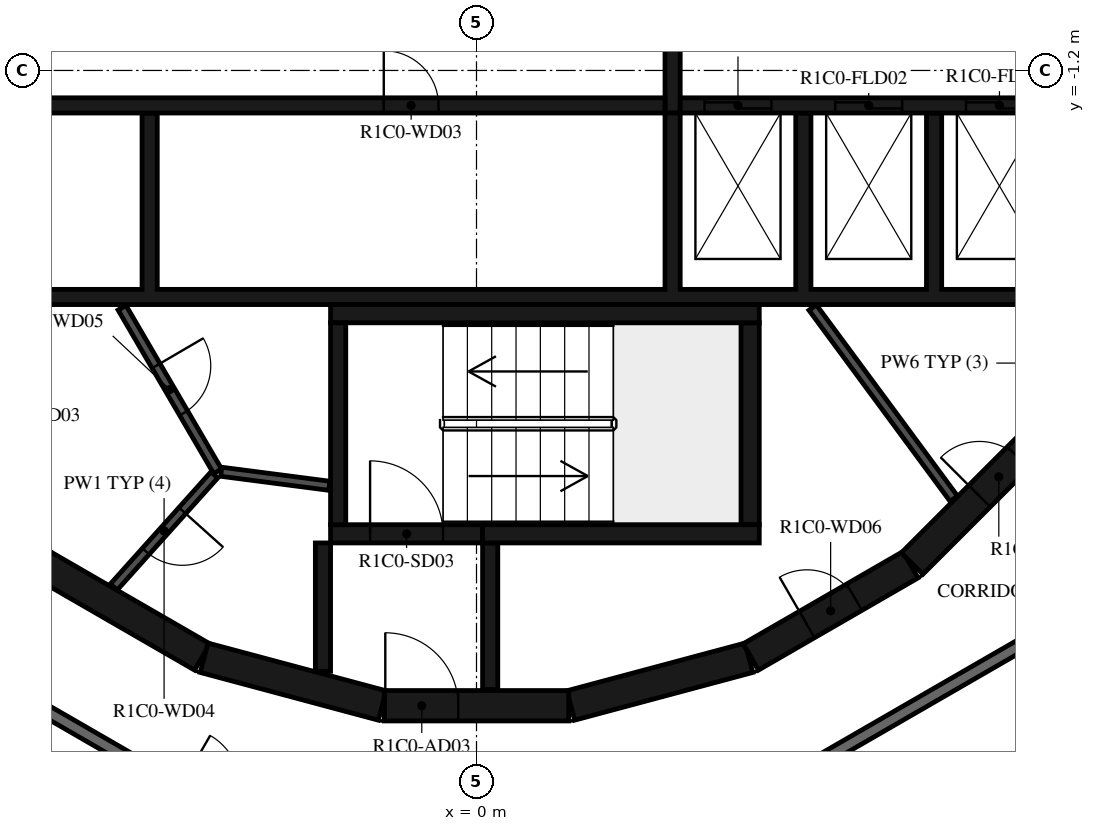
"""IFC4 building model, lengths in metres.
Left out: names, types, materials, properties, quantities, classifications, styles, units other than length and angle.
Written with IfcOpenShell. Run it as: python <this file> out.ifc"""

import sys

from ifc_helpers import new_model, si_unit, direction, frame, frame_2d, origin, place, context, subcontext, project, spatial, polyline, rectangle, outline, extrude, element, fill, save


model = new_model("IFC4")
c1 = context("Model", 3, precision=1e-05, world=origin(), true_north=direction((0.0, 1.0)))
c2 = subcontext(c1, "Body", "Model", "MODEL_VIEW")
j1 = project(units=[si_unit("LENGTHUNIT", "METRE"), si_unit("PLANEANGLEUNIT", "RADIAN")], contexts=[c1])
p1 = place(None, origin())
s1 = spatial("IfcSite", under=j1, at=p1, CompositionType="ELEMENT")
p2 = place(p1, origin())
s2 = spatial("IfcBuilding", under=s1, at=p2, CompositionType="ELEMENT")
p3 = place(p2, frame((0.0, 0.0, 59.4)))
s3 = spatial("IfcBuildingStorey", under=s2, at=p3, CompositionType="ELEMENT", Elevation=59.4)
p4 = place(p3, frame((1.55, -11.643, 0.0), z_axis=(0.0, 0.0, 1.0), x_axis=(0.965948410781, 0.258734743916, 0.0)))
e1 = element("IfcWall", 1, at=p4, inside=s3, PredefinedType="SHEAR", context=c2, shape_type="SweptSolid", body=[
    extrude(rectangle(XDim=3.033, YDim=0.5, at=frame_2d((1.516, 0.0))), origin(), (0.0, 0.0, 1.0), 3.12),
])
p5 = place(p3, frame((4.51, -10.845, 0.0), z_axis=(0.0, 0.0, 1.0), x_axis=(0.865975092491, 0.500087131594, 0.0)))
e2 = element("IfcWall", 2, at=p5, inside=s3, PredefinedType="SHEAR", context=c2, shape_type="SweptSolid", body=[
    extrude(rectangle(XDim=3.033, YDim=0.5, at=frame_2d((1.516, 0.0))), origin(), (0.0, 0.0, 1.0), 3.12),
])
p6 = place(p5, frame((1.066, 0.0, 0.0)))
e3 = element("IfcOpeningElement", 3, at=p6, cuts=e2, PredefinedType="OPENING", context=c2, shape_type="SweptSolid", body=[
    extrude(rectangle(XDim=0.9, YDim=2.1, at=frame_2d((0.45, 1.05))), frame((0.0, 0.26, 0.0), z_axis=(0.0, -1.0, 0.0), x_axis=(1.0, 0.0, 0.0)), (0.0, 0.0, 1.0), 0.52),
])
p7 = place(p3, frame((7.164, -9.308, 0.0), z_axis=(0.0, 0.0, 1.0), x_axis=(0.707106781187, 0.707106781187, 0.0)))
e4 = element("IfcWall", 4, at=p7, inside=s3, PredefinedType="SHEAR", context=c2, shape_type="SweptSolid", body=[
    extrude(rectangle(XDim=3.032, YDim=0.5, at=frame_2d((1.516, 0.0))), origin(), (0.0, 0.0, 1.0), 3.12),
])
p8 = place(p7, frame((1.566, 0.0, 0.0)))
e5 = element("IfcOpeningElement", 5, at=p8, cuts=e4, PredefinedType="OPENING", context=c2, shape_type="SweptSolid", body=[
    extrude(rectangle(XDim=0.9, YDim=2.1, at=frame_2d((0.45, 1.05))), frame((0.0, 0.26, 0.0), z_axis=(0.0, -1.0, 0.0), x_axis=(1.0, 0.0, 0.0)), (0.0, 0.0, 1.0), 0.52),
])
for number, where, z_axis, x_axis in (
    (6, (-7.137, -9.329, 0.0), (0.0, 0.0, 1.0), (0.866, -0.5, 0.0)),
    (7, (-4.479, -10.858, 0.0), (0.0, 0.0, 1.0), (0.966, -0.259, 0.0)),
):
    element("IfcWall", number, at=place(p3, frame(where, z_axis=z_axis, x_axis=x_axis)), inside=s3, PredefinedType="SHEAR", context=c2, shape_type="SweptSolid", body=[
        extrude(rectangle(XDim=3.033, YDim=0.5, at=frame_2d((1.516, 0.0))), origin(), (0.0, 0.0, 1.0), 3.12),
    ])
p9 = place(p3, frame((-1.516, -11.647, 0.0), z_axis=(0.0, 0.0, 1.0), x_axis=(1.0, 0.0, 0.0)))
e8 = element("IfcWall", 8, at=p9, inside=s3, PredefinedType="SHEAR", context=c2, shape_type="SweptSolid", body=[
    extrude(rectangle(XDim=3.033, YDim=0.5, at=frame_2d((1.516, 0.0))), origin(), (0.0, 0.0, 1.0), 3.12),
])
p10 = place(p9, frame((0.016, 0.0, 0.0)))
e9 = element("IfcOpeningElement", 9, at=p10, cuts=e8, PredefinedType="OPENING", context=c2, shape_type="SweptSolid", body=[
    extrude(rectangle(XDim=1.2, YDim=2.1, at=frame_2d((0.6, 1.05))), frame((0.0, 0.26, 0.0), z_axis=(0.0, -1.0, 0.0), x_axis=(1.0, 0.0, 0.0)), (0.0, 0.0, 1.0), 0.52),
])
p11 = place(p3, frame((-2.275, -8.67, 0.0), z_axis=(0.0, 0.0, 1.0), x_axis=(0.0, 1.0, 0.0)))
e10 = element("IfcWall", 10, at=p11, inside=s3, PredefinedType="SHEAR", context=c2, shape_type="SweptSolid", body=[
    extrude(rectangle(XDim=3.32, YDim=0.25, at=frame_2d((1.66, 0.0))), origin(), (0.0, 0.0, 1.0), 3.12),
])
p12 = place(p3, frame((-2.4, -5.2, 0.0), z_axis=(0.0, 0.0, 1.0), x_axis=(1.0, 0.0, 0.0)))
e11 = element("IfcWall", 11, at=p12, inside=s3, PredefinedType="SHEAR", context=c2, shape_type="SweptSolid", body=[
    extrude(rectangle(XDim=7.05, YDim=0.3, at=frame_2d((3.525, 0.0))), origin(), (0.0, 0.0, 1.0), 3.12),
])
p13 = place(p3, frame((4.5, -8.67, 0.0), z_axis=(0.0, 0.0, 1.0), x_axis=(0.0, 1.0, 0.0)))
e12 = element("IfcWall", 12, at=p13, inside=s3, PredefinedType="SHEAR", context=c2, shape_type="SweptSolid", body=[
    extrude(rectangle(XDim=3.32, YDim=0.3, at=frame_2d((1.66, 0.0))), origin(), (0.0, 0.0, 1.0), 3.12),
])
p14 = place(p3, frame((0.1, -8.82, 0.0), z_axis=(0.0, 0.0, 1.0), x_axis=(1.0, 0.0, 0.0)))
e13 = element("IfcWall", 13, at=p14, inside=s3, PredefinedType="SHEAR", context=c2, shape_type="SweptSolid", body=[
    extrude(rectangle(XDim=4.55, YDim=0.3, at=frame_2d((2.275, 0.0))), origin(), (0.0, 0.0, 1.0), 3.12),
])
p15 = place(p3, frame((-2.4, -8.82, 0.0), z_axis=(0.0, 0.0, 1.0), x_axis=(1.0, 0.0, 0.0)))
e14 = element("IfcWall", 14, at=p15, inside=s3, PredefinedType="SHEAR", context=c2, shape_type="SweptSolid", body=[
    extrude(rectangle(XDim=2.5, YDim=0.3, at=frame_2d((1.25, 0.0))), origin(), (0.0, 0.0, 1.0), 3.12),
])
p16 = place(p15, frame((0.65, 0.0, 0.0)))
e15 = element("IfcOpeningElement", 15, at=p16, cuts=e14, PredefinedType="OPENING", context=c2, shape_type="SweptSolid", body=[
    extrude(rectangle(XDim=1.2, YDim=2.1, at=frame_2d((0.6, 1.05))), frame((0.0, 0.16, 0.0), z_axis=(0.0, -1.0, 0.0), x_axis=(1.0, 0.0, 0.0)), (0.0, 0.0, 1.0), 0.32),
])
p17 = place(p3, frame((-2.525, -8.97, 0.0), z_axis=(0.0, 0.0, 1.0), x_axis=(0.0, -1.0, 0.0)))
e16 = element("IfcWall", 16, at=p17, inside=s3, PredefinedType="SHEAR", context=c2, shape_type="SweptSolid", body=[
    extrude(rectangle(XDim=2.11, YDim=0.25, at=frame_2d((1.055, 0.0))), origin(), (0.0, 0.0, 1.0), 3.12),
])
p18 = place(p3, frame((0.225, -8.97, 0.0), z_axis=(0.0, 0.0, 1.0), x_axis=(0.0, -1.0, 0.0)))
e17 = element("IfcWall", 17, at=p18, inside=s3, PredefinedType="SHEAR", context=c2, shape_type="SweptSolid", body=[
    extrude(rectangle(XDim=2.41, YDim=0.25, at=frame_2d((1.205, 0.0))), origin(), (0.0, 0.0, 1.0), 3.12),
])
p19 = place(p3, origin())
e18 = element("IfcWall", 18, at=p19, inside=s3, PredefinedType="SHEAR", context=c2, shape_type="SweptSolid", body=[
    extrude(outline(polyline([(9.8, -5.05), (9.8, -4.8), (9.8, -1.9), (9.55, -1.9), (9.55, -4.8), (7.65, -4.8), (7.65, -1.9), (7.4, -1.9), (7.4, -4.8), (5.5, -4.8), (5.5, -1.9), (5.25, -1.9), (5.25, -4.8), (3.35, -4.8), (3.35, -1.9), (3.1, -1.9), (3.1, -4.8), (-5.25, -4.8), (-5.25, -1.9), (-5.5, -1.9), (-5.5, -4.8), (-7.4, -4.8), (-7.4, -1.9), (-7.65, -1.9), (-7.65, -4.8), (-9.55, -4.8), (-9.55, -1.9), (-9.8, -1.9), (-9.8, -4.8), (-9.8, -5.05), (9.8, -5.05)])), origin(), (0.0, 0.0, 1.0), 3.12),
])
p20 = place(p3, frame((-11.28, -1.775, 0.0), z_axis=(0.0, 0.0, 1.0), x_axis=(1.0, 0.0, 0.0)))
e19 = element("IfcWall", 19, at=p20, inside=s3, PredefinedType="SHEAR", context=c2, shape_type="SweptSolid", body=[
    extrude(rectangle(XDim=14.38, YDim=0.25, at=frame_2d((7.19, 0.0))), origin(), (0.0, 0.0, 1.0), 3.12),
])
p21 = place(p20, frame((9.755, 0.0, 0.0)))
e20 = element("IfcOpeningElement", 20, at=p21, cuts=e19, PredefinedType="OPENING", context=c2, shape_type="SweptSolid", body=[
    extrude(rectangle(XDim=0.9, YDim=2.1, at=frame_2d((0.45, 1.05))), frame((0.0, 0.135, 0.0), z_axis=(0.0, -1.0, 0.0), x_axis=(1.0, 0.0, 0.0)), (0.0, 0.0, 1.0), 0.27),
])
p22 = place(p3, frame((3.35, -1.775, 0.0), z_axis=(0.0, 0.0, 1.0), x_axis=(1.0, 0.0, 0.0)))
e21 = element("IfcWall", 21, at=p22, inside=s3, PredefinedType="SHEAR", context=c2, shape_type="SweptSolid", body=[
    extrude(rectangle(XDim=7.93, YDim=0.25, at=frame_2d((3.965, 0.0))), origin(), (0.0, 0.0, 1.0), 3.12),
])
p23 = place(p22, frame((0.4, 0.0, 0.0)))
e22 = element("IfcOpeningElement", 22, at=p23, cuts=e21, PredefinedType="OPENING", context=c2, shape_type="SweptSolid", body=[
    extrude(rectangle(XDim=1.1, YDim=2.4, at=frame_2d((0.55, 1.2))), frame((0.0, 0.135, 0.0), z_axis=(0.0, -1.0, 0.0), x_axis=(1.0, 0.0, 0.0)), (0.0, 0.0, 1.0), 0.27),
])
p24 = place(p22, frame((2.55, 0.0, 0.0)))
e23 = element("IfcOpeningElement", 23, at=p24, cuts=e21, PredefinedType="OPENING", context=c2, shape_type="SweptSolid", body=[
    extrude(rectangle(XDim=1.1, YDim=2.4, at=frame_2d((0.55, 1.2))), frame((0.0, 0.135, 0.0), z_axis=(0.0, -1.0, 0.0), x_axis=(1.0, 0.0, 0.0)), (0.0, 0.0, 1.0), 0.27),
])
p25 = place(p22, frame((4.7, 0.0, 0.0)))
e24 = element("IfcOpeningElement", 24, at=p25, cuts=e21, PredefinedType="OPENING", context=c2, shape_type="SweptSolid", body=[
    extrude(rectangle(XDim=1.1, YDim=2.4, at=frame_2d((0.55, 1.2))), frame((0.0, 0.135, 0.0), z_axis=(0.0, -1.0, 0.0), x_axis=(1.0, 0.0, 0.0)), (0.0, 0.0, 1.0), 0.27),
])
p26 = place(p3, frame((3.225, -1.9, 0.0), z_axis=(0.0, 0.0, 1.0), x_axis=(0.0, 1.0, 0.0)))
e25 = element("IfcWall", 25, at=p26, inside=s3, PredefinedType="SHEAR", context=c2, shape_type="SweptSolid", body=[
    extrude(rectangle(XDim=3.8, YDim=0.25, at=frame_2d((1.9, 0.0))), origin(), (0.0, 0.0, 1.0), 3.12),
])
p27 = place(p3, frame((5.528, -5.098, 0.0), z_axis=(0.0, 0.0, 1.0), x_axis=(0.594034318069, -0.804439698769, 0.0)))
e26 = element("IfcWall", 26, at=p27, inside=s3, PredefinedType="PARTITIONING", context=c2, shape_type="SweptSolid", body=[
    extrude(rectangle(XDim=3.907, YDim=0.15, at=frame_2d((1.953, 0.0))), origin(), (0.0, 0.0, 1.0), 3.12),
])
p28 = place(p3, frame((-5.829, -5.102, 0.0), z_axis=(0.0, 0.0, 1.0), x_axis=(0.504480008384, -0.863423373057, 0.0)))
e27 = element("IfcWall", 27, at=p28, inside=s3, PredefinedType="PARTITIONING", context=c2, shape_type="SweptSolid", body=[
    extrude(rectangle(XDim=3.115, YDim=0.15, at=frame_2d((1.558, 0.0))), origin(), (0.0, 0.0, 1.0), 3.12),
])
p29 = place(p28, frame((1.107, 0.0, 0.0)))
e28 = element("IfcOpeningElement", 28, at=p29, cuts=e27, PredefinedType="OPENING", context=c2, shape_type="SweptSolid", body=[
    extrude(rectangle(XDim=0.9, YDim=2.1, at=frame_2d((0.45, 1.05))), frame((0.0, 0.085, 0.0), z_axis=(0.0, -1.0, 0.0), x_axis=(1.0, 0.0, 0.0)), (0.0, 0.0, 1.0), 0.17),
])
p30 = place(p3, frame((-4.311, -7.851, 0.0), z_axis=(0.0, 0.0, 1.0), x_axis=(-0.667869133096, -0.744278725383, 0.0)))
e29 = element("IfcWall", 29, at=p30, inside=s3, PredefinedType="PARTITIONING", context=c2, shape_type="SweptSolid", body=[
    extrude(rectangle(XDim=2.476, YDim=0.15, at=frame_2d((1.238, 0.0))), origin(), (0.0, 0.0, 1.0), 3.12),
])
p31 = place(p30, frame((0.788, 0.0, 0.0)))
e30 = element("IfcOpeningElement", 30, at=p31, cuts=e29, PredefinedType="OPENING", context=c2, shape_type="SweptSolid", body=[
    extrude(rectangle(XDim=0.9, YDim=2.1, at=frame_2d((0.45, 1.05))), frame((0.0, 0.085, 0.0), z_axis=(0.0, -1.0, 0.0), x_axis=(1.0, 0.0, 0.0)), (0.0, 0.0, 1.0), 0.17),
])
p32 = place(p3, frame((-4.198, -7.799, 0.0), z_axis=(0.0, 0.0, 1.0), x_axis=(0.991686747293, -0.128675542523, 0.0)))
e31 = element("IfcWall", 31, at=p32, inside=s3, PredefinedType="PARTITIONING", context=c2, shape_type="SweptSolid", body=[
    extrude(rectangle(XDim=1.793, YDim=0.15, at=frame_2d((0.896, 0.0))), origin(), (0.0, 0.0, 1.0), 3.12),
])
p33 = place(p3, frame((-10.029, -10.029, 0.0), z_axis=(0.0, 0.0, 1.0), x_axis=(0.866022878987, -0.500004373052, 0.0)))
e32 = element("IfcWall", 32, at=p33, inside=s3, PredefinedType="STANDARD", context=c2, shape_type="SweptSolid", body=[
    extrude(rectangle(XDim=7.146, YDim=0.2, at=frame_2d((3.573, 0.0))), origin(), (0.0, 0.0, 1.0), 3.12),
])
p34 = place(p33, frame((5.947, 0.0, 0.0)))
e33 = element("IfcOpeningElement", 33, at=p34, cuts=e32, PredefinedType="OPENING", context=c2, shape_type="SweptSolid", body=[
    extrude(rectangle(XDim=1.0, YDim=2.1, at=frame_2d((0.5, 1.05))), frame((0.0, 0.11, 0.0), z_axis=(0.0, -1.0, 0.0), x_axis=(1.0, 0.0, 0.0)), (0.0, 0.0, 1.0), 0.22),
])
p35 = place(p3, frame((3.671, -13.7, 0.0), z_axis=(0.0, 0.0, 1.0), x_axis=(0.866024439905, 0.500001669485, 0.0)))
e34 = element("IfcWall", 34, at=p35, inside=s3, PredefinedType="STANDARD", context=c2, shape_type="SweptSolid", body=[
    extrude(rectangle(XDim=7.342, YDim=0.2, at=frame_2d((3.671, 0.0))), origin(), (0.0, 0.0, 1.0), 3.12),
])
p36 = place(p3, frame((-11.127, -11.127, 0.0), z_axis=(0.0, 0.0, 1.0), x_axis=(0.866034514313, -0.499984219769, 0.0)))
e35 = element("IfcWall", 35, at=p36, inside=s3, PredefinedType="PARTITIONING", context=c2, shape_type="SweptSolid", body=[
    extrude(rectangle(XDim=5.006, YDim=0.12, at=frame_2d((2.503, 0.0))), origin(), (0.0, 0.0, 1.0), 3.12),
])
p37 = place(p36, frame((0.2, 0.0, 0.0)))
e36 = element("IfcOpeningElement", 36, at=p37, cuts=e35, PredefinedType="OPENING", context=c2, shape_type="SweptSolid", body=[
    extrude(rectangle(XDim=0.9, YDim=2.1, at=frame_2d((0.45, 1.05))), frame((0.0, 0.07, 0.0), z_axis=(0.0, -1.0, 0.0), x_axis=(1.0, 0.0, 0.0)), (0.0, 0.0, 1.0), 0.14),
])
p38 = place(p16, origin())
e37 = element("IfcDoor", 37, at=p38, inside=s3, OperationType="SINGLE_SWING_LEFT", PredefinedType="DOOR", context=c2, shape_type="SweptSolid", body=[
    extrude(rectangle(XDim=1.2, YDim=2.1, at=frame_2d((0.6, 1.05))), frame((0.0, 0.025, 0.0), z_axis=(0.0, -1.0, 0.0), x_axis=(1.0, 0.0, 0.0)), (0.0, 0.0, 1.0), 0.05),
])
fill(e15, e37)
p39 = place(p10, origin())
e38 = element("IfcDoor", 38, at=p39, inside=s3, OperationType="SINGLE_SWING_RIGHT", PredefinedType="DOOR", context=c2, shape_type="SweptSolid", body=[
    extrude(rectangle(XDim=1.2, YDim=2.1, at=frame_2d((0.6, 1.05))), frame((0.0, 0.025, 0.0), z_axis=(0.0, -1.0, 0.0), x_axis=(1.0, 0.0, 0.0)), (0.0, 0.0, 1.0), 0.05),
])
fill(e9, e38)
p40 = place(p23, origin())
e39 = element("IfcDoor", 39, at=p40, inside=s3, OperationType="DOUBLE_DOOR_SLIDING", PredefinedType="DOOR", context=c2, shape_type="SweptSolid", body=[
    extrude(rectangle(XDim=1.1, YDim=2.4, at=frame_2d((0.55, 1.2))), frame((0.0, 0.025, 0.0), z_axis=(0.0, -1.0, 0.0), x_axis=(1.0, 0.0, 0.0)), (0.0, 0.0, 1.0), 0.05),
])
fill(e22, e39)
p41 = place(p24, origin())
e40 = element("IfcDoor", 40, at=p41, inside=s3, OperationType="DOUBLE_DOOR_SLIDING", PredefinedType="DOOR", context=c2, shape_type="SweptSolid", body=[
    extrude(rectangle(XDim=1.1, YDim=2.4, at=frame_2d((0.55, 1.2))), frame((0.0, 0.025, 0.0), z_axis=(0.0, -1.0, 0.0), x_axis=(1.0, 0.0, 0.0)), (0.0, 0.0, 1.0), 0.05),
])
fill(e23, e40)
p42 = place(p25, origin())
e41 = element("IfcDoor", 41, at=p42, inside=s3, OperationType="DOUBLE_DOOR_SLIDING", PredefinedType="DOOR", context=c2, shape_type="SweptSolid", body=[
    extrude(rectangle(XDim=1.1, YDim=2.4, at=frame_2d((0.55, 1.2))), frame((0.0, 0.025, 0.0), z_axis=(0.0, -1.0, 0.0), x_axis=(1.0, 0.0, 0.0)), (0.0, 0.0, 1.0), 0.05),
])
fill(e24, e41)
p43 = place(p21, origin())
e42 = element("IfcDoor", 42, at=p43, inside=s3, OperationType="SINGLE_SWING_RIGHT", PredefinedType="DOOR", context=c2, shape_type="SweptSolid", body=[
    extrude(rectangle(XDim=0.9, YDim=2.1, at=frame_2d((0.45, 1.05))), frame((0.0, 0.025, 0.0), z_axis=(0.0, -1.0, 0.0), x_axis=(1.0, 0.0, 0.0)), (0.0, 0.0, 1.0), 0.05),
])
fill(e20, e42)
p44 = place(p31, origin())
e43 = element("IfcDoor", 43, at=p44, inside=s3, OperationType="SINGLE_SWING_LEFT", PredefinedType="DOOR", context=c2, shape_type="SweptSolid", body=[
    extrude(rectangle(XDim=0.9, YDim=2.1, at=frame_2d((0.45, 1.05))), frame((0.0, 0.025, 0.0), z_axis=(0.0, -1.0, 0.0), x_axis=(1.0, 0.0, 0.0)), (0.0, 0.0, 1.0), 0.05),
])
fill(e30, e43)
p45 = place(p29, origin())
e44 = element("IfcDoor", 44, at=p45, inside=s3, OperationType="SINGLE_SWING_RIGHT", PredefinedType="DOOR", context=c2, shape_type="SweptSolid", body=[
    extrude(rectangle(XDim=0.9, YDim=2.1, at=frame_2d((0.45, 1.05))), frame((0.0, 0.025, 0.0), z_axis=(0.0, -1.0, 0.0), x_axis=(1.0, 0.0, 0.0)), (0.0, 0.0, 1.0), 0.05),
])
fill(e28, e44)
p46 = place(p6, origin())
e45 = element("IfcDoor", 45, at=p46, inside=s3, OperationType="SINGLE_SWING_LEFT", PredefinedType="DOOR", context=c2, shape_type="SweptSolid", body=[
    extrude(rectangle(XDim=0.9, YDim=2.1, at=frame_2d((0.45, 1.05))), frame((0.0, 0.025, 0.0), z_axis=(0.0, -1.0, 0.0), x_axis=(1.0, 0.0, 0.0)), (0.0, 0.0, 1.0), 0.05),
])
fill(e3, e45)
p47 = place(p8, origin())
e46 = element("IfcDoor", 46, at=p47, inside=s3, OperationType="SINGLE_SWING_RIGHT", PredefinedType="DOOR", context=c2, shape_type="SweptSolid", body=[
    extrude(rectangle(XDim=0.9, YDim=2.1, at=frame_2d((0.45, 1.05))), frame((0.0, 0.025, 0.0), z_axis=(0.0, -1.0, 0.0), x_axis=(1.0, 0.0, 0.0)), (0.0, 0.0, 1.0), 0.05),
])
fill(e5, e46)
save(model, sys.argv[1])
